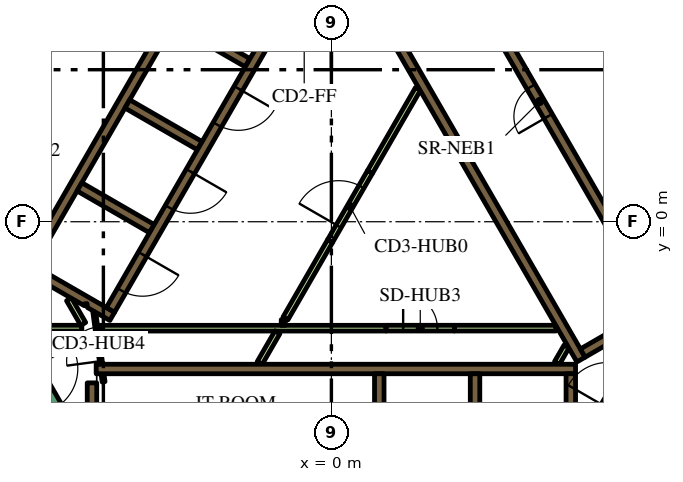
"""IFC4 building model, lengths in metres.
Left out: names, types, materials, properties, quantities, classifications, styles, units other than length and angle.
Written with IfcOpenShell. Run it as: python <this file> out.ifc"""

import sys

from ifc_helpers import new_model, si_unit, direction, frame, frame_2d, origin, place, context, subcontext, project, spatial, polyline, rectangle, outline, extrude, element, fill, save


model = new_model("IFC4")
c1 = context("Model", 3, precision=1e-05, world=origin(), true_north=direction((0.0, 1.0)))
c2 = subcontext(c1, "Body", "Model", "MODEL_VIEW")
j1 = project(units=[si_unit("LENGTHUNIT", "METRE"), si_unit("PLANEANGLEUNIT", "RADIAN")], contexts=[c1])
p1 = place(None, origin())
s1 = spatial("IfcSite", under=j1, at=p1, CompositionType="ELEMENT")
p2 = place(p1, origin())
s2 = spatial("IfcBuilding", under=s1, at=p2, CompositionType="ELEMENT")
p3 = place(p2, frame((0.0, 0.0, 130.5)))
s3 = spatial("IfcBuildingStorey", under=s2, at=p3, CompositionType="ELEMENT", Elevation=130.5)
p4 = place(p3, frame((6.776, 13.364, 0.0), z_axis=(0.0, 0.0, 1.0), x_axis=(0.500004177138, -0.8660229921, 0.0)))
e1 = element("IfcWall", 1, at=p4, inside=s3, PredefinedType="SOLIDWALL", context=c2, shape_type="SweptSolid", body=[
    extrude(rectangle(XDim=20.204, YDim=0.9, at=frame_2d((10.102, 0.0))), origin(), (0.0, 0.0, 1.0), 3.9),
])
p5 = place(p3, frame((-14.268, 0.387, 0.0), z_axis=(0.0, 0.0, 1.0), x_axis=(0.499994617707, 0.866028511231, 0.0)))
e2 = element("IfcWall", 2, at=p5, inside=s3, PredefinedType="SOLIDWALL", context=c2, shape_type="SweptSolid", body=[
    extrude(rectangle(XDim=18.817, YDim=0.9, at=frame_2d((9.409, 0.0))), origin(), (0.0, 0.0, 1.0), 3.9),
])
p6 = place(p3, frame((-6.3, -4.24, 0.0), z_axis=(0.0, 0.0, 1.0), x_axis=(0.0, -1.0, 0.0)))
e3 = element("IfcWall", 3, at=p6, inside=s3, PredefinedType="SOLIDWALL", context=c2, shape_type="SweptSolid", body=[
    extrude(rectangle(XDim=2.914, YDim=0.25, at=frame_2d((1.457, 0.0))), origin(), (0.0, 0.0, 1.0), 3.9),
])
p7 = place(p3, frame((-6.19, -3.875, 0.0), z_axis=(0.0, 0.0, 1.0), x_axis=(1.0, 0.0, 0.0)))
e4 = element("IfcWall", 4, at=p7, inside=s3, PredefinedType="SOLIDWALL", context=c2, shape_type="SweptSolid", body=[
    extrude(rectangle(XDim=12.615, YDim=0.25, at=frame_2d((6.307, 0.0))), origin(), (0.0, 0.0, 1.0), 3.9),
])
p8 = place(p3, frame((6.3, -7.268, 0.0), z_axis=(0.0, 0.0, 1.0), x_axis=(0.0, 1.0, 0.0)))
e5 = element("IfcWall", 5, at=p8, inside=s3, PredefinedType="SOLIDWALL", context=c2, shape_type="SweptSolid", body=[
    extrude(rectangle(XDim=3.268, YDim=0.25, at=frame_2d((1.634, 0.0))), origin(), (0.0, 0.0, 1.0), 3.9),
])
for number, where, z_axis, x_axis in (
    (6, (3.78, -4.0, 0.0), (0.0, 0.0, 1.0), (0.0, -1.0, 0.0)),
    (7, (1.26, -4.0, 0.0), (0.0, 0.0, 1.0), (0.0, -1.0, 0.0)),
):
    element("IfcWall", number, at=place(p3, frame(where, z_axis=z_axis, x_axis=x_axis)), inside=s3, PredefinedType="SOLIDWALL", context=c2, shape_type="SweptSolid", body=[
        extrude(rectangle(XDim=2.2, YDim=0.25, at=frame_2d((1.1, 0.0))), origin(), (0.0, 0.0, 1.0), 3.9),
    ])
p9 = place(p3, origin())
e8 = element("IfcWall", 8, at=p9, inside=s3, PredefinedType="SOLIDWALL", context=c2, shape_type="SweptSolid", body=[
    extrude(outline(polyline([(0.335, 6.925), (0.335, 7.075), (0.335, 7.075), (0.335, 7.075), (0.245, 7.075), (0.035, 7.439), (0.252, 7.564), (0.377, 7.348), (1.512, 5.382), (1.637, 5.165), (2.221, 4.153), (2.771, 3.199), (2.896, 2.983), (3.138, 2.564), (4.031, 1.017), (4.156, 0.801), (5.292, -1.165), (5.417, -1.382), (6.073, -2.519), (6.552, -3.348), (6.677, -3.564), (6.46, -3.689), (0.332, 6.925), (0.335, 6.925), (0.335, 6.925), (0.335, 6.925)])), origin(), (0.0, 0.0, 1.0), 3.9),
])
p10 = place(p3, frame((9.352, -1.875, 0.0), z_axis=(0.0, 0.0, 1.0), x_axis=(-0.866024844342, -0.500000968981, 0.0)))
e9 = element("IfcWall", 9, at=p10, inside=s3, PredefinedType="SOLIDWALL", context=c2, shape_type="SweptSolid", body=[
    extrude(rectangle(XDim=3.162, YDim=0.25, at=frame_2d((1.581, 0.0))), origin(), (0.0, 0.0, 1.0), 3.9),
])
p11 = place(p3, frame((-8.06, -1.311, 0.0), z_axis=(0.0, 0.0, 1.0), x_axis=(0.50000273126, 0.866023826885, 0.0)))
e10 = element("IfcWall", 10, at=p11, inside=s3, PredefinedType="SOLIDWALL", context=c2, shape_type="SweptSolid", body=[
    extrude(rectangle(XDim=10.33, YDim=0.25, at=frame_2d((5.165, 0.0))), origin(), (0.0, 0.0, 1.0), 3.9),
])
for number, where, z_axis, x_axis in (
    (11, (-2.204, 4.182, 0.0), (0.0, 0.0, 1.0), (-0.866, 0.5, 0.0)),
    (12, (-5.369, 3.1, 0.0), (0.0, 0.0, 1.0), (0.866, -0.5, 0.0)),
    (13, (-4.724, -0.182, 0.0), (0.0, 0.0, 1.0), (-0.866, 0.5, 0.0)),
):
    element("IfcWall", number, at=place(p3, frame(where, z_axis=z_axis, x_axis=x_axis)), inside=s3, PredefinedType="SOLIDWALL", context=c2, shape_type="SweptSolid", body=[
        extrude(rectangle(XDim=2.2, YDim=0.25, at=frame_2d((1.1, 0.0))), origin(), (0.0, 0.0, 1.0), 3.9),
    ])
e14 = element("IfcWall", 14, at=p9, inside=s3, PredefinedType="SOLIDWALL", context=c2, shape_type="SweptSolid", body=[
    extrude(outline(polyline([(-5.922, -2.257), (-5.922, -2.257), (-5.705, -2.382), (-5.83, -2.598), (-6.418, -2.258), (-6.433, -2.153), (-6.433, -2.153), (-6.433, -2.153), (-6.508, -2.163), (-6.508, -2.163), (-6.508, -2.163), (-6.501, -2.21), (-7.952, -1.373), (-7.827, -1.156), (-5.922, -2.257)])), origin(), (0.0, 0.0, 1.0), 3.9),
])
p12 = place(p3, frame((-8.395, -2.8, 0.0), z_axis=(0.0, 0.0, 1.0), x_axis=(1.0, 0.0, 0.0)))
e15 = element("IfcWall", 15, at=p12, inside=s3, PredefinedType="PARTITIONING", context=c2, shape_type="SweptSolid", body=[
    extrude(rectangle(XDim=1.828, YDim=0.15, at=frame_2d((0.914, 0.0))), origin(), (0.0, 0.0, 1.0), 2.6),
])
p13 = place(p3, frame((-6.531, -2.689, 0.0), z_axis=(0.0, 0.0, 1.0), x_axis=(-0.499967446111, 0.866044197965, 0.0)))
e16 = element("IfcWall", 16, at=p13, inside=s3, PredefinedType="PARTITIONING", context=c2, shape_type="SweptSolid", body=[
    extrude(rectangle(XDim=0.748, YDim=0.15, at=frame_2d((0.374, 0.0))), origin(), (0.0, 0.0, 1.0), 2.6),
])
p14 = place(p3, frame((-6.086, -2.801, 0.0), z_axis=(0.0, 0.0, 1.0), x_axis=(1.0, 0.0, 0.0)))
e17 = element("IfcWall", 17, at=p14, inside=s3, PredefinedType="PARTITIONING", context=c2, shape_type="SweptSolid", body=[
    extrude(rectangle(XDim=7.524, YDim=0.15, at=frame_2d((3.762, 0.0))), origin(), (0.0, 0.0, 1.0), 2.6),
])
p15 = place(p3, frame((-1.887, -3.718, 0.0), z_axis=(0.0, 0.0, 1.0), x_axis=(0.499842898591, 0.866116087328, 0.0)))
e18 = element("IfcWall", 18, at=p15, inside=s3, PredefinedType="PARTITIONING", context=c2, shape_type="SweptSolid", body=[
    extrude(rectangle(XDim=0.936, YDim=0.15, at=frame_2d((0.468, 0.0))), origin(), (0.0, 0.0, 1.0), 2.6),
])
p16 = place(p3, frame((-1.212, -2.651, 0.0), z_axis=(0.0, 0.0, 1.0), x_axis=(-1.0, 0.0, 0.0)))
e19 = element("IfcWall", 19, at=p16, inside=s3, PredefinedType="PARTITIONING", context=c2, shape_type="SweptSolid", body=[
    extrude(rectangle(XDim=0.108, YDim=0.15, at=frame_2d((0.054, 0.0))), origin(), (0.0, 0.0, 1.0), 2.6),
])
p17 = place(p3, frame((-1.208, -2.544, 0.0), z_axis=(0.0, 0.0, 1.0), x_axis=(0.499995339376, 0.86602809458, 0.0)))
e20 = element("IfcWall", 20, at=p17, inside=s3, PredefinedType="PARTITIONING", context=c2, shape_type="SweptSolid", body=[
    extrude(rectangle(XDim=2.349, YDim=0.15, at=frame_2d((1.175, 0.0))), origin(), (0.0, 0.0, 1.0), 2.6),
])
p18 = place(p3, frame((5.936, -3.718, 0.0), z_axis=(0.0, 0.0, 1.0), x_axis=(0.499890179513, 0.866088799389, 0.0)))
e21 = element("IfcWall", 21, at=p18, inside=s3, PredefinedType="PARTITIONING", context=c2, shape_type="SweptSolid", body=[
    extrude(rectangle(XDim=0.504, YDim=0.15, at=frame_2d((0.252, 0.0))), origin(), (0.0, 0.0, 1.0), 2.6),
])
p19 = place(p3, frame((3.238, -2.8, 0.0), z_axis=(0.0, 0.0, 1.0), x_axis=(1.0, 0.0, 0.0)))
e22 = element("IfcWall", 22, at=p19, inside=s3, PredefinedType="PARTITIONING", context=c2, shape_type="SweptSolid", body=[
    extrude(rectangle(XDim=2.672, YDim=0.15, at=frame_2d((1.336, 0.0))), origin(), (0.0, 0.0, 1.0), 2.6),
])
p20 = place(p3, frame((1.016, 1.309, 0.0), z_axis=(0.0, 0.0, 1.0), x_axis=(0.49998231768, 0.866035612436, 0.0)))
e23 = element("IfcWall", 23, at=p20, inside=s3, PredefinedType="PARTITIONING", context=c2, shape_type="SweptSolid", body=[
    extrude(rectangle(XDim=2.521, YDim=0.15, at=frame_2d((1.26, 0.0))), origin(), (0.0, 0.0, 1.0), 2.6),
])
p21 = place(p3, frame((11.553, -0.46, 0.0), z_axis=(0.0, 0.0, 1.0), x_axis=(-0.500006514828, 0.866021642414, 0.0)))
e24 = element("IfcWall", 24, at=p21, inside=s3, PredefinedType="SOLIDWALL", context=c2, shape_type="SweptSolid", body=[
    extrude(rectangle(XDim=12.35, YDim=0.25, at=frame_2d((6.175, 0.0))), origin(), (0.0, 0.0, 1.0), 3.9),
])
p22 = place(p21, frame((0.585, 0.0, 0.0)))
e25 = element("IfcOpeningElement", 25, at=p22, cuts=e24, PredefinedType="OPENING", context=c2, shape_type="SweptSolid", body=[
    extrude(rectangle(XDim=1.1, YDim=2.1, at=frame_2d((0.55, 1.05))), frame((0.0, 0.135, 0.0), z_axis=(0.0, -1.0, 0.0), x_axis=(1.0, 0.0, 0.0)), (0.0, 0.0, 1.0), 0.27),
])
p23 = place(p21, frame((3.105, 0.0, 0.0)))
e26 = element("IfcOpeningElement", 26, at=p23, cuts=e24, PredefinedType="OPENING", context=c2, shape_type="SweptSolid", body=[
    extrude(rectangle(XDim=1.1, YDim=2.1, at=frame_2d((0.55, 1.05))), frame((0.0, 0.135, 0.0), z_axis=(0.0, -1.0, 0.0), x_axis=(1.0, 0.0, 0.0)), (0.0, 0.0, 1.0), 0.27),
])
p24 = place(p21, frame((5.625, 0.0, 0.0)))
e27 = element("IfcOpeningElement", 27, at=p24, cuts=e24, PredefinedType="OPENING", context=c2, shape_type="SweptSolid", body=[
    extrude(rectangle(XDim=1.1, YDim=2.1, at=frame_2d((0.55, 1.05))), frame((0.0, 0.135, 0.0), z_axis=(0.0, -1.0, 0.0), x_axis=(1.0, 0.0, 0.0)), (0.0, 0.0, 1.0), 0.27),
])
p25 = place(p3, frame((8.565, -2.185, 0.0), z_axis=(0.0, 0.0, 1.0), x_axis=(-0.499997954832, 0.866026584559, 0.0)))
e28 = element("IfcWall", 28, at=p25, inside=s3, PredefinedType="SOLIDWALL", context=c2, shape_type="SweptSolid", body=[
    extrude(rectangle(XDim=12.35, YDim=0.25, at=frame_2d((6.175, 0.0))), origin(), (0.0, 0.0, 1.0), 3.9),
])
p26 = place(p25, frame((5.725, 0.0, 0.0)))
e29 = element("IfcOpeningElement", 29, at=p26, cuts=e28, PredefinedType="OPENING", context=c2, shape_type="SweptSolid", body=[
    extrude(rectangle(XDim=0.9, YDim=2.1, at=frame_2d((0.45, 1.05))), frame((0.0, 0.135, 0.0), z_axis=(0.0, -1.0, 0.0), x_axis=(1.0, 0.0, 0.0)), (0.0, 0.0, 1.0), 0.27),
])
p27 = place(p3, frame((-6.008, 9.144, 0.0), z_axis=(0.0, 0.0, 1.0), x_axis=(-0.500006956611, -0.866021387346, 0.0)))
e30 = element("IfcWall", 30, at=p27, inside=s3, PredefinedType="SOLIDWALL", context=c2, shape_type="SweptSolid", body=[
    extrude(rectangle(XDim=9.83, YDim=0.25, at=frame_2d((4.915, 0.0))), origin(), (0.0, 0.0, 1.0), 3.9),
])
p28 = place(p27, frame((6.985, 0.0, 0.0)))
e31 = element("IfcOpeningElement", 31, at=p28, cuts=e30, PredefinedType="OPENING", context=c2, shape_type="SweptSolid", body=[
    extrude(rectangle(XDim=0.9, YDim=2.1, at=frame_2d((0.45, 1.05))), frame((0.0, 0.135, 0.0), z_axis=(0.0, -1.0, 0.0), x_axis=(1.0, 0.0, 0.0)), (0.0, 0.0, 1.0), 0.27),
])
p29 = place(p3, frame((-0.898, 6.194, 0.0), z_axis=(0.0, 0.0, 1.0), x_axis=(-0.499996202215, -0.866027596426, 0.0)))
e32 = element("IfcWall", 32, at=p29, inside=s3, PredefinedType="SOLIDWALL", context=c2, shape_type="SweptSolid", body=[
    extrude(rectangle(XDim=9.83, YDim=0.25, at=frame_2d((4.915, 0.0))), origin(), (0.0, 0.0, 1.0), 3.9),
])
p30 = place(p29, frame((0.585, 0.0, 0.0)))
e33 = element("IfcOpeningElement", 33, at=p30, cuts=e32, PredefinedType="OPENING", context=c2, shape_type="SweptSolid", body=[
    extrude(rectangle(XDim=1.1, YDim=2.1, at=frame_2d((0.55, 1.05))), frame((0.0, 0.135, 0.0), z_axis=(0.0, -1.0, 0.0), x_axis=(1.0, 0.0, 0.0)), (0.0, 0.0, 1.0), 0.27),
])
p31 = place(p29, frame((3.105, 0.0, 0.0)))
e34 = element("IfcOpeningElement", 34, at=p31, cuts=e32, PredefinedType="OPENING", context=c2, shape_type="SweptSolid", body=[
    extrude(rectangle(XDim=1.1, YDim=2.1, at=frame_2d((0.55, 1.05))), frame((0.0, 0.135, 0.0), z_axis=(0.0, -1.0, 0.0), x_axis=(1.0, 0.0, 0.0)), (0.0, 0.0, 1.0), 0.27),
])
p32 = place(p29, frame((5.625, 0.0, 0.0)))
e35 = element("IfcOpeningElement", 35, at=p32, cuts=e32, PredefinedType="OPENING", context=c2, shape_type="SweptSolid", body=[
    extrude(rectangle(XDim=1.1, YDim=2.1, at=frame_2d((0.55, 1.05))), frame((0.0, 0.135, 0.0), z_axis=(0.0, -1.0, 0.0), x_axis=(1.0, 0.0, 0.0)), (0.0, 0.0, 1.0), 0.27),
])
p33 = place(p29, frame((8.145, 0.0, 0.0)))
e36 = element("IfcOpeningElement", 36, at=p33, cuts=e32, PredefinedType="OPENING", context=c2, shape_type="SweptSolid", body=[
    extrude(rectangle(XDim=1.1, YDim=2.1, at=frame_2d((0.55, 1.05))), frame((0.0, 0.135, 0.0), z_axis=(0.0, -1.0, 0.0), x_axis=(1.0, 0.0, 0.0)), (0.0, 0.0, 1.0), 0.27),
])
p34 = place(p3, frame((7.048, -5.292, 0.0), z_axis=(0.0, 0.0, 1.0), x_axis=(0.49994051562, 0.866059744384, 0.0)))
e37 = element("IfcWall", 37, at=p34, inside=s3, PredefinedType="SOLIDWALL", context=c2, shape_type="SweptSolid", body=[
    extrude(rectangle(XDim=2.1, YDim=0.4, at=frame_2d((1.05, 0.0))), origin(), (0.0, 0.0, 1.0), 3.9),
])
p35 = place(p34, frame((0.45, 0.0, 0.0)))
e38 = element("IfcOpeningElement", 38, at=p35, cuts=e37, PredefinedType="OPENING", context=c2, shape_type="SweptSolid", body=[
    extrude(rectangle(XDim=1.2, YDim=2.1, at=frame_2d((0.6, 1.05))), frame((0.0, 0.21, 0.0), z_axis=(0.0, -1.0, 0.0), x_axis=(1.0, 0.0, 0.0)), (0.0, 0.0, 1.0), 0.42),
])
p36 = place(p3, frame((-8.098, -3.474, 0.0), z_axis=(0.0, 0.0, 1.0), x_axis=(0.49994051562, -0.866059744384, 0.0)))
e39 = element("IfcWall", 39, at=p36, inside=s3, PredefinedType="SOLIDWALL", context=c2, shape_type="SweptSolid", body=[
    extrude(rectangle(XDim=2.1, YDim=0.4, at=frame_2d((1.05, 0.0))), origin(), (0.0, 0.0, 1.0), 3.9),
])
p37 = place(p36, frame((0.45, 0.0, 0.0)))
e40 = element("IfcOpeningElement", 40, at=p37, cuts=e39, PredefinedType="OPENING", context=c2, shape_type="SweptSolid", body=[
    extrude(rectangle(XDim=1.2, YDim=2.1, at=frame_2d((0.6, 1.05))), frame((0.0, 0.21, 0.0), z_axis=(0.0, -1.0, 0.0), x_axis=(1.0, 0.0, 0.0)), (0.0, 0.0, 1.0), 0.42),
])
p38 = place(p3, frame((-0.034, -0.509, 0.0), z_axis=(0.0, 0.0, 1.0), x_axis=(0.49994051562, 0.866059744384, 0.0)))
e41 = element("IfcWall", 41, at=p38, inside=s3, PredefinedType="PARTITIONING", context=c2, shape_type="SweptSolid", body=[
    extrude(rectangle(XDim=2.1, YDim=0.15, at=frame_2d((1.05, 0.0))), origin(), (0.0, 0.0, 1.0), 2.6),
])
p39 = place(p38, frame((0.45, 0.0, 0.0)))
e42 = element("IfcOpeningElement", 42, at=p39, cuts=e41, PredefinedType="OPENING", context=c2, shape_type="SweptSolid", body=[
    extrude(rectangle(XDim=1.2, YDim=2.1, at=frame_2d((0.6, 1.05))), frame((0.0, 0.085, 0.0), z_axis=(0.0, -1.0, 0.0), x_axis=(1.0, 0.0, 0.0)), (0.0, 0.0, 1.0), 0.17),
])
p40 = place(p3, frame((-5.995, -4.213, 0.0), z_axis=(0.0, 0.0, 1.0), x_axis=(-0.132072335448, 0.991240081014, 0.0)))
e43 = element("IfcWall", 43, at=p40, inside=s3, PredefinedType="PARTITIONING", context=c2, shape_type="SweptSolid", body=[
    extrude(rectangle(XDim=2.1, YDim=0.076, at=frame_2d((1.05, 0.0))), origin(), (0.0, 0.0, 1.0), 2.6),
])
p41 = place(p40, frame((0.55, 0.0, 0.0)))
e44 = element("IfcOpeningElement", 44, at=p41, cuts=e43, PredefinedType="OPENING", context=c2, shape_type="SweptSolid", body=[
    extrude(rectangle(XDim=0.9, YDim=2.1, at=frame_2d((0.45, 1.05))), frame((0.0, 0.048, 0.0), z_axis=(0.0, -1.0, 0.0), x_axis=(1.0, 0.0, 0.0)), (0.0, 0.0, 1.0), 0.096),
])
p42 = place(p3, frame((1.438, -2.8, 0.0), z_axis=(0.0, 0.0, 1.0), x_axis=(1.0, 0.0, 0.0)))
e45 = element("IfcWall", 45, at=p42, inside=s3, PredefinedType="PARTITIONING", context=c2, shape_type="SweptSolid", body=[
    extrude(rectangle(XDim=1.8, YDim=0.15, at=frame_2d((0.9, 0.0))), origin(), (0.0, 0.0, 1.0), 2.6),
])
p43 = place(p42, frame((0.45, 0.0, 0.0)))
e46 = element("IfcOpeningElement", 46, at=p43, cuts=e45, PredefinedType="OPENING", context=c2, shape_type="SweptSolid", body=[
    extrude(rectangle(XDim=0.9, YDim=2.1, at=frame_2d((0.45, 1.05))), frame((0.0, 0.085, 0.0), z_axis=(0.0, -1.0, 0.0), x_axis=(1.0, 0.0, 0.0)), (0.0, 0.0, 1.0), 0.17),
])
p44 = place(p3, frame((6.163, 18.475, 0.0), z_axis=(0.0, 0.0, 1.0), x_axis=(0.500001317485, -0.866024643133, 0.0)))
e47 = element("IfcWall", 47, at=p44, inside=s3, PredefinedType="PARTITIONING", context=c2, shape_type="SweptSolid", body=[
    extrude(rectangle(XDim=25.767, YDim=0.15, at=frame_2d((12.883, 0.0))), origin(), (0.0, 0.0, 1.0), 2.6),
])
p45 = place(p44, frame((21.774, 0.0, 0.0)))
e48 = element("IfcOpeningElement", 48, at=p45, cuts=e47, PredefinedType="OPENING", context=c2, shape_type="SweptSolid", body=[
    extrude(rectangle(XDim=1.0, YDim=2.1, at=frame_2d((0.5, 1.05))), frame((0.0, 0.085, 0.0), z_axis=(0.0, -1.0, 0.0), x_axis=(1.0, 0.0, 0.0)), (0.0, 0.0, 1.0), 0.17),
])
p46 = place(p44, frame((15.571, 0.0, 0.0)))
e49 = element("IfcOpeningElement", 49, at=p46, cuts=e47, PredefinedType="OPENING", context=c2, shape_type="SweptSolid", body=[
    extrude(rectangle(XDim=1.0, YDim=2.1, at=frame_2d((0.5, 1.05))), frame((0.0, 0.085, 0.0), z_axis=(0.0, -1.0, 0.0), x_axis=(1.0, 0.0, 0.0)), (0.0, 0.0, 1.0), 0.17),
])
p47 = place(p44, frame((9.265, 0.0, 0.0)))
e50 = element("IfcOpeningElement", 50, at=p47, cuts=e47, PredefinedType="OPENING", context=c2, shape_type="SweptSolid", body=[
    extrude(rectangle(XDim=1.0, YDim=2.1, at=frame_2d((0.5, 1.05))), frame((0.0, 0.085, 0.0), z_axis=(0.0, -1.0, 0.0), x_axis=(1.0, 0.0, 0.0)), (0.0, 0.0, 1.0), 0.17),
])
p48 = place(p44, frame((3.063, 0.0, 0.0)))
e51 = element("IfcOpeningElement", 51, at=p48, cuts=e47, PredefinedType="OPENING", context=c2, shape_type="SweptSolid", body=[
    extrude(rectangle(XDim=1.0, YDim=2.1, at=frame_2d((0.5, 1.05))), frame((0.0, 0.085, 0.0), z_axis=(0.0, -1.0, 0.0), x_axis=(1.0, 0.0, 0.0)), (0.0, 0.0, 1.0), 0.17),
])
p49 = place(p3, frame((-19.081, -3.9, 0.0), z_axis=(0.0, 0.0, 1.0), x_axis=(0.499998313975, 0.866026377209, 0.0)))
e52 = element("IfcWall", 52, at=p49, inside=s3, PredefinedType="PARTITIONING", context=c2, shape_type="SweptSolid", body=[
    extrude(rectangle(XDim=25.766, YDim=0.15, at=frame_2d((12.883, 0.0))), origin(), (0.0, 0.0, 1.0), 2.6),
])
p50 = place(p49, frame((24.141, 0.0, 0.0)))
e53 = element("IfcOpeningElement", 53, at=p50, cuts=e52, PredefinedType="OPENING", context=c2, shape_type="SweptSolid", body=[
    extrude(rectangle(XDim=1.1, YDim=2.1, at=frame_2d((0.55, 1.05))), frame((0.0, 0.085, 0.0), z_axis=(0.0, -1.0, 0.0), x_axis=(1.0, 0.0, 0.0)), (0.0, 0.0, 1.0), 0.17),
])
p51 = place(p49, frame((13.144, 0.0, 0.0)))
e54 = element("IfcOpeningElement", 54, at=p51, cuts=e52, PredefinedType="OPENING", context=c2, shape_type="SweptSolid", body=[
    extrude(rectangle(XDim=1.0, YDim=2.1, at=frame_2d((0.5, 1.05))), frame((0.0, 0.085, 0.0), z_axis=(0.0, -1.0, 0.0), x_axis=(1.0, 0.0, 0.0)), (0.0, 0.0, 1.0), 0.17),
])
p52 = place(p49, frame((11.593, 0.0, 0.0)))
e55 = element("IfcOpeningElement", 55, at=p52, cuts=e52, PredefinedType="OPENING", context=c2, shape_type="SweptSolid", body=[
    extrude(rectangle(XDim=1.1, YDim=2.1, at=frame_2d((0.55, 1.05))), frame((0.0, 0.085, 0.0), z_axis=(0.0, -1.0, 0.0), x_axis=(1.0, 0.0, 0.0)), (0.0, 0.0, 1.0), 0.17),
])
p53 = place(p49, frame((0.596, 0.0, 0.0)))
e56 = element("IfcOpeningElement", 56, at=p53, cuts=e52, PredefinedType="OPENING", context=c2, shape_type="SweptSolid", body=[
    extrude(rectangle(XDim=1.0, YDim=2.1, at=frame_2d((0.5, 1.05))), frame((0.0, 0.085, 0.0), z_axis=(0.0, -1.0, 0.0), x_axis=(1.0, 0.0, 0.0)), (0.0, 0.0, 1.0), 0.17),
])
p54 = place(p26, origin())
e57 = element("IfcDoor", 57, at=p54, inside=s3, OperationType="SINGLE_SWING_LEFT", PredefinedType="DOOR", context=c2, shape_type="SweptSolid", body=[
    extrude(rectangle(XDim=0.9, YDim=2.1, at=frame_2d((0.45, 1.05))), frame((0.0, 0.025, 0.0), z_axis=(0.0, -1.0, 0.0), x_axis=(1.0, 0.0, 0.0)), (0.0, 0.0, 1.0), 0.05),
])
fill(e29, e57)
p55 = place(p31, origin())
e58 = element("IfcDoor", 58, at=p55, inside=s3, OperationType="DOUBLE_DOOR_SLIDING", PredefinedType="DOOR", context=c2, shape_type="SweptSolid", body=[
    extrude(rectangle(XDim=1.1, YDim=2.1, at=frame_2d((0.55, 1.05))), frame((0.0, 0.025, 0.0), z_axis=(0.0, -1.0, 0.0), x_axis=(1.0, 0.0, 0.0)), (0.0, 0.0, 1.0), 0.05),
])
fill(e34, e58)
p56 = place(p32, origin())
e59 = element("IfcDoor", 59, at=p56, inside=s3, OperationType="DOUBLE_DOOR_SLIDING", PredefinedType="DOOR", context=c2, shape_type="SweptSolid", body=[
    extrude(rectangle(XDim=1.1, YDim=2.1, at=frame_2d((0.55, 1.05))), frame((0.0, 0.025, 0.0), z_axis=(0.0, -1.0, 0.0), x_axis=(1.0, 0.0, 0.0)), (0.0, 0.0, 1.0), 0.05),
])
fill(e35, e59)
p57 = place(p33, origin())
e60 = element("IfcDoor", 60, at=p57, inside=s3, OperationType="DOUBLE_DOOR_SLIDING", PredefinedType="DOOR", context=c2, shape_type="SweptSolid", body=[
    extrude(rectangle(XDim=1.1, YDim=2.1, at=frame_2d((0.55, 1.05))), frame((0.0, 0.025, 0.0), z_axis=(0.0, -1.0, 0.0), x_axis=(1.0, 0.0, 0.0)), (0.0, 0.0, 1.0), 0.05),
])
fill(e36, e60)
p58 = place(p37, origin())
e61 = element("IfcDoor", 61, at=p58, inside=s3, OperationType="SINGLE_SWING_LEFT", PredefinedType="DOOR", context=c2, shape_type="SweptSolid", body=[
    extrude(rectangle(XDim=1.2, YDim=2.1, at=frame_2d((0.6, 1.05))), frame((0.0, 0.025, 0.0), z_axis=(0.0, -1.0, 0.0), x_axis=(1.0, 0.0, 0.0)), (0.0, 0.0, 1.0), 0.05),
])
fill(e40, e61)
p59 = place(p39, origin())
e62 = element("IfcDoor", 62, at=p59, inside=s3, OperationType="SINGLE_SWING_LEFT", PredefinedType="DOOR", context=c2, shape_type="SweptSolid", body=[
    extrude(rectangle(XDim=1.2, YDim=2.1, at=frame_2d((0.6, 1.05))), frame((0.0, 0.025, 0.0), z_axis=(0.0, -1.0, 0.0), x_axis=(1.0, 0.0, 0.0)), (0.0, 0.0, 1.0), 0.05),
])
fill(e42, e62)
p60 = place(p41, origin())
e63 = element("IfcDoor", 63, at=p60, inside=s3, OperationType="SINGLE_SWING_LEFT", PredefinedType="DOOR", context=c2, shape_type="SweptSolid", body=[
    extrude(rectangle(XDim=0.9, YDim=2.1, at=frame_2d((0.45, 1.05))), frame((0.0, 0.025, 0.0), z_axis=(0.0, -1.0, 0.0), x_axis=(1.0, 0.0, 0.0)), (0.0, 0.0, 1.0), 0.05),
])
fill(e44, e63)
p61 = place(p43, origin())
e64 = element("IfcDoor", 64, at=p61, inside=s3, OperationType="SINGLE_SWING_LEFT", PredefinedType="DOOR", context=c2, shape_type="SweptSolid", body=[
    extrude(rectangle(XDim=0.9, YDim=2.1, at=frame_2d((0.45, 1.05))), frame((0.0, 0.025, 0.0), z_axis=(0.0, -1.0, 0.0), x_axis=(1.0, 0.0, 0.0)), (0.0, 0.0, 1.0), 0.05),
])
fill(e46, e64)
save(model, sys.argv[1])
